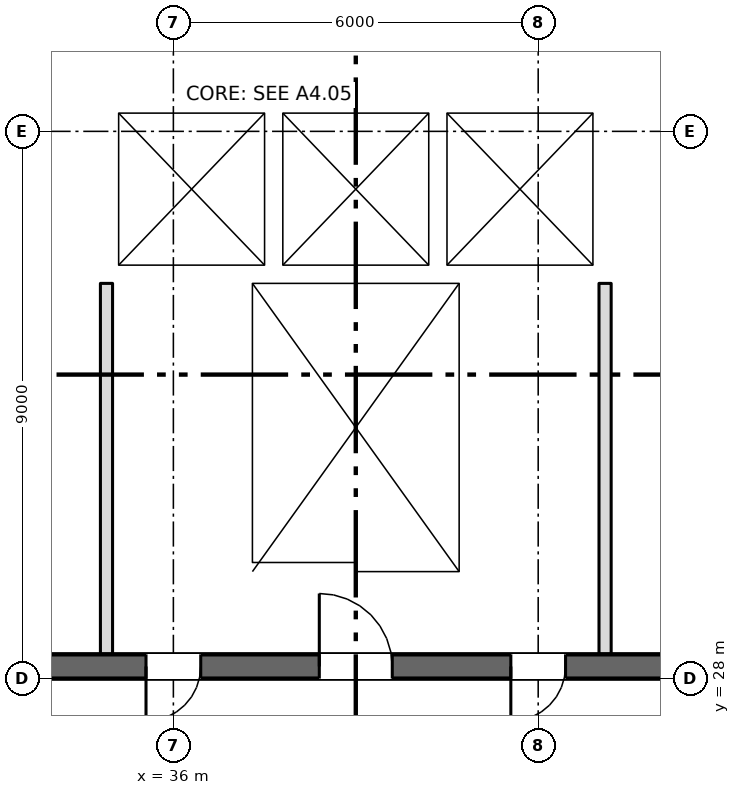
"""IFC4 building model, lengths in metres.
Left out: names, types, materials, properties, quantities, classifications, styles, units other than length and angle.
Written with IfcOpenShell. Run it as: python <this file> out.ifc"""

import sys

from ifc_helpers import new_model, si_unit, direction, frame, frame_2d, origin, place, context, subcontext, project, spatial, rectangle, extrude, element, fill, save


model = new_model("IFC4")
c1 = context("Model", 3, precision=1e-05, world=origin(), true_north=direction((0.0, 1.0)))
c2 = subcontext(c1, "Body", "Model", "MODEL_VIEW")
j1 = project(units=[si_unit("LENGTHUNIT", "METRE"), si_unit("PLANEANGLEUNIT", "RADIAN")], contexts=[c1])
p1 = place(None, origin())
s1 = spatial("IfcSite", under=j1, at=p1, CompositionType="ELEMENT")
p2 = place(p1, origin())
s2 = spatial("IfcBuilding", under=s1, at=p2, CompositionType="ELEMENT")
p3 = place(p2, frame((0.0, 0.0, 11.3)))
s3 = spatial("IfcBuildingStorey", under=s2, at=p3, CompositionType="ELEMENT", Elevation=11.3)
p4 = place(p3, frame((6.7, 28.2, 0.0), z_axis=(0.0, 0.0, 1.0), x_axis=(1.0, 0.0, 0.0)))
e1 = element("IfcWall", 1, at=p4, inside=s3, PredefinedType="SHEAR", context=c2, shape_type="SweptSolid", body=[
    extrude(rectangle(XDim=66.3, YDim=0.4, at=frame_2d((33.15, 0.0))), origin(), (0.0, 0.0, 1.0), 6.1),
])
p5 = place(p4, frame((13.85, 0.0, 0.0)))
e2 = element("IfcOpeningElement", 2, at=p5, cuts=e1, PredefinedType="OPENING", context=c2, shape_type="SweptSolid", body=[
    extrude(rectangle(XDim=0.9, YDim=2.1, at=frame_2d((0.45, 1.05))), frame((0.0, 0.21, 0.0), z_axis=(0.0, -1.0, 0.0), x_axis=(1.0, 0.0, 0.0)), (0.0, 0.0, 1.0), 0.42),
])
p6 = place(p4, frame((48.562, 0.0, 0.0)))
e3 = element("IfcOpeningElement", 3, at=p6, cuts=e1, PredefinedType="OPENING", context=c2, shape_type="SweptSolid", body=[
    extrude(rectangle(XDim=0.9, YDim=2.1, at=frame_2d((0.45, 1.05))), frame((0.0, 0.21, 0.0), z_axis=(0.0, -1.0, 0.0), x_axis=(1.0, 0.0, 0.0)), (0.0, 0.0, 1.0), 0.42),
])
p7 = place(p4, frame((51.137, 0.0, 0.0)))
e4 = element("IfcOpeningElement", 4, at=p7, cuts=e1, PredefinedType="OPENING", context=c2, shape_type="SweptSolid", body=[
    extrude(rectangle(XDim=0.9, YDim=2.1, at=frame_2d((0.45, 1.05))), frame((0.0, 0.21, 0.0), z_axis=(0.0, -1.0, 0.0), x_axis=(1.0, 0.0, 0.0)), (0.0, 0.0, 1.0), 0.42),
])
p8 = place(p4, frame((1.35, 0.0, 0.0)))
e5 = element("IfcOpeningElement", 5, at=p8, cuts=e1, PredefinedType="OPENING", context=c2, shape_type="SweptSolid", body=[
    extrude(rectangle(XDim=0.9, YDim=2.1, at=frame_2d((0.45, 1.05))), frame((0.0, 0.21, 0.0), z_axis=(0.0, -1.0, 0.0), x_axis=(1.0, 0.0, 0.0)), (0.0, 0.0, 1.0), 0.42),
])
p9 = place(p4, frame((59.363, 0.0, 0.0)))
e6 = element("IfcOpeningElement", 6, at=p9, cuts=e1, PredefinedType="OPENING", context=c2, shape_type="SweptSolid", body=[
    extrude(rectangle(XDim=0.9, YDim=2.1, at=frame_2d((0.45, 1.05))), frame((0.0, 0.21, 0.0), z_axis=(0.0, -1.0, 0.0), x_axis=(1.0, 0.0, 0.0)), (0.0, 0.0, 1.0), 0.42),
])
p10 = place(p4, frame((63.538, 0.0, 0.0)))
e7 = element("IfcOpeningElement", 7, at=p10, cuts=e1, PredefinedType="OPENING", context=c2, shape_type="SweptSolid", body=[
    extrude(rectangle(XDim=0.9, YDim=2.1, at=frame_2d((0.45, 1.05))), frame((0.0, 0.21, 0.0), z_axis=(0.0, -1.0, 0.0), x_axis=(1.0, 0.0, 0.0)), (0.0, 0.0, 1.0), 0.42),
])
p11 = place(p4, frame((4.7, 0.0, 0.0)))
e8 = element("IfcOpeningElement", 8, at=p11, cuts=e1, PredefinedType="OPENING", context=c2, shape_type="SweptSolid", body=[
    extrude(rectangle(XDim=1.2, YDim=2.1, at=frame_2d((0.6, 1.05))), frame((0.0, 0.21, 0.0), z_axis=(0.0, -1.0, 0.0), x_axis=(1.0, 0.0, 0.0)), (0.0, 0.0, 1.0), 0.42),
])
p12 = place(p4, frame((31.7, 0.0, 0.0)))
e9 = element("IfcOpeningElement", 9, at=p12, cuts=e1, PredefinedType="OPENING", context=c2, shape_type="SweptSolid", body=[
    extrude(rectangle(XDim=1.2, YDim=2.1, at=frame_2d((0.6, 1.05))), frame((0.0, 0.21, 0.0), z_axis=(0.0, -1.0, 0.0), x_axis=(1.0, 0.0, 0.0)), (0.0, 0.0, 1.0), 0.42),
])
p13 = place(p4, frame((55.2, 0.0, 0.0)))
e10 = element("IfcOpeningElement", 10, at=p13, cuts=e1, PredefinedType="OPENING", context=c2, shape_type="SweptSolid", body=[
    extrude(rectangle(XDim=1.2, YDim=2.1, at=frame_2d((0.6, 1.05))), frame((0.0, 0.21, 0.0), z_axis=(0.0, -1.0, 0.0), x_axis=(1.0, 0.0, 0.0)), (0.0, 0.0, 1.0), 0.42),
])
p14 = place(p4, frame((21.7, 0.0, 0.0)))
e11 = element("IfcOpeningElement", 11, at=p14, cuts=e1, PredefinedType="OPENING", context=c2, shape_type="SweptSolid", body=[
    extrude(rectangle(XDim=1.2, YDim=2.1, at=frame_2d((0.6, 1.05))), frame((0.0, 0.21, 0.0), z_axis=(0.0, -1.0, 0.0), x_axis=(1.0, 0.0, 0.0)), (0.0, 0.0, 1.0), 0.42),
])
p15 = place(p4, frame((41.7, 0.0, 0.0)))
e12 = element("IfcOpeningElement", 12, at=p15, cuts=e1, PredefinedType="OPENING", context=c2, shape_type="SweptSolid", body=[
    extrude(rectangle(XDim=1.2, YDim=2.1, at=frame_2d((0.6, 1.05))), frame((0.0, 0.21, 0.0), z_axis=(0.0, -1.0, 0.0), x_axis=(1.0, 0.0, 0.0)), (0.0, 0.0, 1.0), 0.42),
])
p16 = place(p4, frame((24.85, 0.0, 0.0)))
e13 = element("IfcOpeningElement", 13, at=p16, cuts=e1, PredefinedType="OPENING", context=c2, shape_type="SweptSolid", body=[
    extrude(rectangle(XDim=2.4, YDim=2.1, at=frame_2d((1.2, 1.05))), frame((0.0, 0.21, 0.0), z_axis=(0.0, -1.0, 0.0), x_axis=(1.0, 0.0, 0.0)), (0.0, 0.0, 1.0), 0.42),
])
p17 = place(p4, frame((37.35, 0.0, 0.0)))
e14 = element("IfcOpeningElement", 14, at=p17, cuts=e1, PredefinedType="OPENING", context=c2, shape_type="SweptSolid", body=[
    extrude(rectangle(XDim=2.4, YDim=2.1, at=frame_2d((1.2, 1.05))), frame((0.0, 0.21, 0.0), z_axis=(0.0, -1.0, 0.0), x_axis=(1.0, 0.0, 0.0)), (0.0, 0.0, 1.0), 0.42),
])
p18 = place(p4, frame((7.8, 0.0, 0.0)))
e15 = element("IfcOpeningElement", 15, at=p18, cuts=e1, PredefinedType="OPENING", context=c2, shape_type="SweptSolid", body=[
    extrude(rectangle(XDim=2.4, YDim=2.1, at=frame_2d((1.2, 1.05))), frame((0.0, 0.21, 0.0), z_axis=(0.0, -1.0, 0.0), x_axis=(1.0, 0.0, 0.0)), (0.0, 0.0, 1.0), 0.42),
])
p19 = place(p4, frame((28.85, 0.0, 0.0)))
e16 = element("IfcOpeningElement", 16, at=p19, cuts=e1, PredefinedType="OPENING", context=c2, shape_type="SweptSolid", body=[
    extrude(rectangle(XDim=0.9, YDim=2.1, at=frame_2d((0.45, 1.05))), frame((0.0, 0.21, 0.0), z_axis=(0.0, -1.0, 0.0), x_axis=(1.0, 0.0, 0.0)), (0.0, 0.0, 1.0), 0.42),
])
p20 = place(p4, frame((34.85, 0.0, 0.0)))
e17 = element("IfcOpeningElement", 17, at=p20, cuts=e1, PredefinedType="OPENING", context=c2, shape_type="SweptSolid", body=[
    extrude(rectangle(XDim=0.9, YDim=2.1, at=frame_2d((0.45, 1.05))), frame((0.0, 0.21, 0.0), z_axis=(0.0, -1.0, 0.0), x_axis=(1.0, 0.0, 0.0)), (0.0, 0.0, 1.0), 0.42),
])
for number, where, z_axis, x_axis in (
    (18, (37.15, 28.4, 0.0), (0.0, 0.0, 1.0), (0.0, 1.0, 0.0)),
    (19, (40.85, 28.4, 0.0), (0.0, 0.0, 1.0), (0.0, 1.0, 0.0)),
):
    element("IfcWall", number, at=place(p3, frame(where, z_axis=z_axis, x_axis=x_axis)), inside=s3, PredefinedType="SHEAR", context=c2, shape_type="SweptSolid", body=[
        extrude(rectangle(XDim=6.1, YDim=0.3, at=frame_2d((3.05, 0.0))), origin(), (0.0, 0.0, 1.0), 6.1),
    ])
p21 = place(p3, frame((34.8, 34.65, 0.0), z_axis=(0.0, 0.0, 1.0), x_axis=(1.0, 0.0, 0.0)))
e20 = element("IfcWall", 20, at=p21, inside=s3, PredefinedType="SHEAR", context=c2, shape_type="SweptSolid", body=[
    extrude(rectangle(XDim=8.4, YDim=0.3, at=frame_2d((4.2, 0.0))), origin(), (0.0, 0.0, 1.0), 6.1),
])
p22 = place(p3, frame((34.8, 37.45, 0.0), z_axis=(0.0, 0.0, 1.0), x_axis=(1.0, 0.0, 0.0)))
e21 = element("IfcWall", 21, at=p22, inside=s3, PredefinedType="SHEAR", context=c2, shape_type="SweptSolid", body=[
    extrude(rectangle(XDim=8.4, YDim=0.3, at=frame_2d((4.2, 0.0))), origin(), (0.0, 0.0, 1.0), 6.1),
])
p23 = place(p22, frame((0.95, 0.0, 0.0)))
e22 = element("IfcOpeningElement", 22, at=p23, cuts=e21, PredefinedType="OPENING", context=c2, shape_type="SweptSolid", body=[
    extrude(rectangle(XDim=1.1, YDim=2.1, at=frame_2d((0.55, 1.05))), frame((0.0, 0.16, 0.0), z_axis=(0.0, -1.0, 0.0), x_axis=(1.0, 0.0, 0.0)), (0.0, 0.0, 1.0), 0.32),
])
p24 = place(p22, frame((3.65, 0.0, 0.0)))
e23 = element("IfcOpeningElement", 23, at=p24, cuts=e21, PredefinedType="OPENING", context=c2, shape_type="SweptSolid", body=[
    extrude(rectangle(XDim=1.1, YDim=2.1, at=frame_2d((0.55, 1.05))), frame((0.0, 0.16, 0.0), z_axis=(0.0, -1.0, 0.0), x_axis=(1.0, 0.0, 0.0)), (0.0, 0.0, 1.0), 0.32),
])
p25 = place(p22, frame((6.35, 0.0, 0.0)))
e24 = element("IfcOpeningElement", 24, at=p25, cuts=e21, PredefinedType="OPENING", context=c2, shape_type="SweptSolid", body=[
    extrude(rectangle(XDim=1.1, YDim=2.1, at=frame_2d((0.55, 1.05))), frame((0.0, 0.16, 0.0), z_axis=(0.0, -1.0, 0.0), x_axis=(1.0, 0.0, 0.0)), (0.0, 0.0, 1.0), 0.32),
])
for number, where, z_axis, x_axis in (
    (25, (34.95, 34.8, 0.0), (0.0, 0.0, 1.0), (0.0, 1.0, 0.0)),
    (26, (43.05, 34.8, 0.0), (0.0, 0.0, 1.0), (0.0, 1.0, 0.0)),
    (27, (37.65, 34.8, 0.0), (0.0, 0.0, 1.0), (0.0, 1.0, 0.0)),
    (28, (40.35, 34.8, 0.0), (0.0, 0.0, 1.0), (0.0, 1.0, 0.0)),
):
    element("IfcWall", number, at=place(p3, frame(where, z_axis=z_axis, x_axis=x_axis)), inside=s3, PredefinedType="SHEAR", context=c2, shape_type="SweptSolid", body=[
        extrude(rectangle(XDim=2.5, YDim=0.3, at=frame_2d((1.25, 0.0))), origin(), (0.0, 0.0, 1.0), 6.1),
    ])
for number, where, z_axis, x_axis in (
    (29, (34.9, 28.4, 0.0), (0.0, 0.0, 1.0), (0.0, 1.0, 0.0)),
    (30, (43.1, 28.4, 0.0), (0.0, 0.0, 1.0), (0.0, 1.0, 0.0)),
):
    element("IfcWall", number, at=place(p3, frame(where, z_axis=z_axis, x_axis=x_axis)), inside=s3, PredefinedType="PARTITIONING", context=c2, shape_type="SweptSolid", body=[
        extrude(rectangle(XDim=6.1, YDim=0.2, at=frame_2d((3.05, 0.0))), origin(), (0.0, 0.0, 1.0), 6.1),
    ])
p26 = place(p23, origin())
e31 = element("IfcDoor", 31, at=p26, inside=s3, OperationType="SLIDING_TO_LEFT", PredefinedType="DOOR", context=c2, shape_type="SweptSolid", body=[
    extrude(rectangle(XDim=1.1, YDim=2.1, at=frame_2d((0.55, 1.05))), frame((0.0, 0.025, 0.0), z_axis=(0.0, -1.0, 0.0), x_axis=(1.0, 0.0, 0.0)), (0.0, 0.0, 1.0), 0.05),
])
fill(e22, e31)
p27 = place(p24, origin())
e32 = element("IfcDoor", 32, at=p27, inside=s3, OperationType="SLIDING_TO_LEFT", PredefinedType="DOOR", context=c2, shape_type="SweptSolid", body=[
    extrude(rectangle(XDim=1.1, YDim=2.1, at=frame_2d((0.55, 1.05))), frame((0.0, 0.025, 0.0), z_axis=(0.0, -1.0, 0.0), x_axis=(1.0, 0.0, 0.0)), (0.0, 0.0, 1.0), 0.05),
])
fill(e23, e32)
p28 = place(p25, origin())
e33 = element("IfcDoor", 33, at=p28, inside=s3, OperationType="SLIDING_TO_LEFT", PredefinedType="DOOR", context=c2, shape_type="SweptSolid", body=[
    extrude(rectangle(XDim=1.1, YDim=2.1, at=frame_2d((0.55, 1.05))), frame((0.0, 0.025, 0.0), z_axis=(0.0, -1.0, 0.0), x_axis=(1.0, 0.0, 0.0)), (0.0, 0.0, 1.0), 0.05),
])
fill(e24, e33)
p29 = place(p12, origin())
e34 = element("IfcDoor", 34, at=p29, inside=s3, OperationType="SINGLE_SWING_LEFT", PredefinedType="DOOR", context=c2, shape_type="SweptSolid", body=[
    extrude(rectangle(XDim=1.2, YDim=2.1, at=frame_2d((0.6, 1.05))), frame((0.0, 0.025, 0.0), z_axis=(0.0, -1.0, 0.0), x_axis=(1.0, 0.0, 0.0)), (0.0, 0.0, 1.0), 0.05),
])
fill(e9, e34)
p30 = place(p19, origin())
e35 = element("IfcDoor", 35, at=p30, inside=s3, OperationType="SINGLE_SWING_LEFT", PredefinedType="DOOR", context=c2, shape_type="SweptSolid", body=[
    extrude(rectangle(XDim=0.9, YDim=2.1, at=frame_2d((0.45, 1.05))), frame((0.0, 0.025, 0.0), z_axis=(0.0, -1.0, 0.0), x_axis=(1.0, 0.0, 0.0)), (0.0, 0.0, 1.0), 0.05),
])
fill(e16, e35)
p31 = place(p20, origin())
e36 = element("IfcDoor", 36, at=p31, inside=s3, OperationType="SINGLE_SWING_LEFT", PredefinedType="DOOR", context=c2, shape_type="SweptSolid", body=[
    extrude(rectangle(XDim=0.9, YDim=2.1, at=frame_2d((0.45, 1.05))), frame((0.0, 0.025, 0.0), z_axis=(0.0, -1.0, 0.0), x_axis=(1.0, 0.0, 0.0)), (0.0, 0.0, 1.0), 0.05),
])
fill(e17, e36)
save(model, sys.argv[1])
